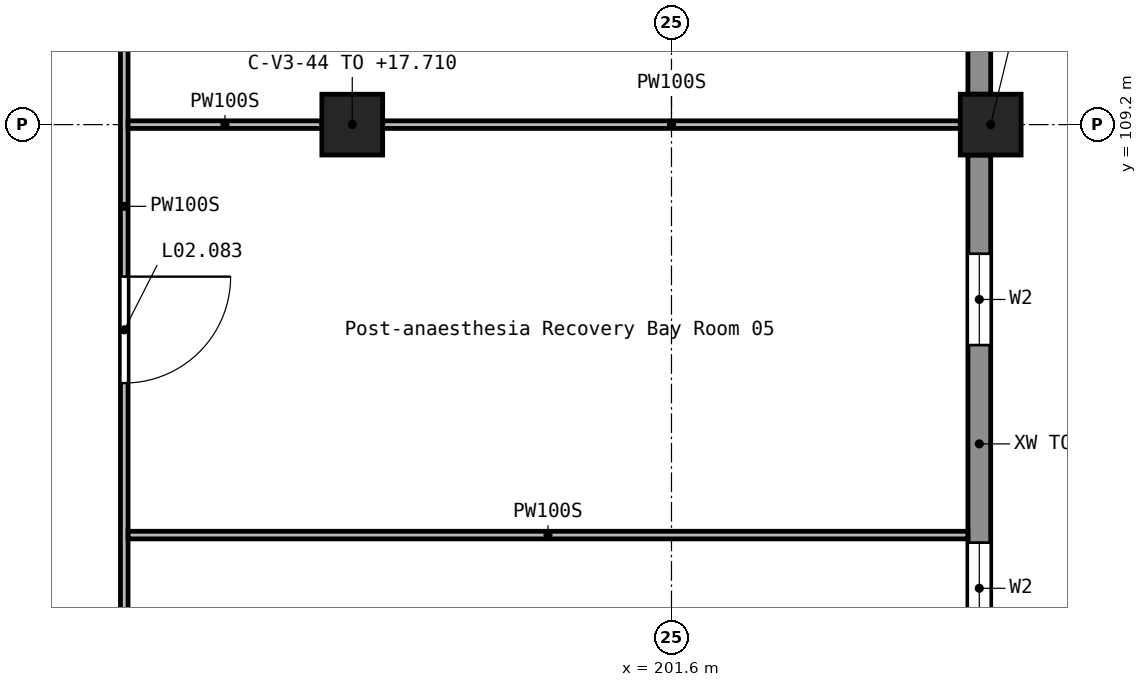
"""IFC4 building model, lengths in metres.
Left out: names, types, materials, properties, quantities, classifications, styles, units other than length and angle.
Written with IfcOpenShell. Run it as: python <this file> out.ifc"""

import sys

from ifc_helpers import new_model, si_unit, direction, frame, frame_2d, origin, origin_2d, place, context, subcontext, project, spatial, rectangle, extrude, element, fill, save


model = new_model("IFC4")
c1 = context("Model", 3, precision=1e-05, world=origin(), true_north=direction((0.0, 1.0)))
c2 = subcontext(c1, "Body", "Model", "MODEL_VIEW")
j1 = project(units=[si_unit("LENGTHUNIT", "METRE"), si_unit("PLANEANGLEUNIT", "RADIAN")], contexts=[c1])
p1 = place(None, origin())
s1 = spatial("IfcSite", under=j1, at=p1, CompositionType="ELEMENT")
p2 = place(p1, origin())
s2 = spatial("IfcBuilding", under=s1, at=p2, CompositionType="ELEMENT")
p3 = place(p2, frame((0.0, 0.0, 12.6)))
s3 = spatial("IfcBuildingStorey", under=s2, at=p3, CompositionType="ELEMENT", Elevation=12.6)
for number, where, z_axis, x_axis in (
    (1, (197.4, 109.2, 0.0), (0.0, 0.0, 1.0), (1.0, 0.0, 0.0)),
    (2, (205.8, 109.2, 0.0), (0.0, 0.0, 1.0), (1.0, 0.0, 0.0)),
):
    element("IfcColumn", number, at=place(p3, frame(where, z_axis=z_axis, x_axis=x_axis)), inside=s3, PredefinedType="COLUMN", context=c2, shape_type="SweptSolid", body=[
        extrude(rectangle(XDim=0.8, YDim=0.8, at=origin_2d()), origin(), (0.0, 0.0, 1.0), 5.11),
    ])
p4 = place(p3, frame((205.65, 101.2, 0.0), z_axis=(0.0, 0.0, 1.0), x_axis=(0.0, 1.0, 0.0)))
e3 = element("IfcWall", 3, at=p4, inside=s3, PredefinedType="STANDARD", context=c2, shape_type="SweptSolid", body=[
    extrude(rectangle(XDim=7.6, YDim=0.3, at=frame_2d((3.8, 0.0))), origin(), (0.0, 0.0, 1.0), 3.05),
])
p5 = place(p4, frame((1.3, 0.0, 1.2)))
e4 = element("IfcOpeningElement", 4, at=p5, cuts=e3, PredefinedType="OPENING", context=c2, shape_type="SweptSolid", body=[
    extrude(rectangle(XDim=1.2, YDim=1.2, at=frame_2d((0.6, 0.6))), frame((0.0, 0.16, 0.0), z_axis=(0.0, -1.0, 0.0), x_axis=(1.0, 0.0, 0.0)), (0.0, 0.0, 1.0), 0.32),
])
p6 = place(p4, frame((5.1, 0.0, 1.2)))
e5 = element("IfcOpeningElement", 5, at=p6, cuts=e3, PredefinedType="OPENING", context=c2, shape_type="SweptSolid", body=[
    extrude(rectangle(XDim=1.2, YDim=1.2, at=frame_2d((0.6, 0.6))), frame((0.0, 0.16, 0.0), z_axis=(0.0, -1.0, 0.0), x_axis=(1.0, 0.0, 0.0)), (0.0, 0.0, 1.0), 0.32),
])
p7 = place(p3, frame((205.65, 109.6, 0.0), z_axis=(0.0, 0.0, 1.0), x_axis=(0.0, 1.0, 0.0)))
e6 = element("IfcWall", 6, at=p7, inside=s3, PredefinedType="STANDARD", context=c2, shape_type="SweptSolid", body=[
    extrude(rectangle(XDim=7.6, YDim=0.3, at=frame_2d((3.8, 0.0))), origin(), (0.0, 0.0, 1.0), 3.05),
])
p8 = place(p7, frame((1.3, 0.0, 1.2)))
e7 = element("IfcOpeningElement", 7, at=p8, cuts=e6, PredefinedType="OPENING", context=c2, shape_type="SweptSolid", body=[
    extrude(rectangle(XDim=1.2, YDim=1.2, at=frame_2d((0.6, 0.6))), frame((0.0, 0.16, 0.0), z_axis=(0.0, -1.0, 0.0), x_axis=(1.0, 0.0, 0.0)), (0.0, 0.0, 1.0), 0.32),
])
p9 = place(p7, frame((5.1, 0.0, 1.2)))
e8 = element("IfcOpeningElement", 8, at=p9, cuts=e6, PredefinedType="OPENING", context=c2, shape_type="SweptSolid", body=[
    extrude(rectangle(XDim=1.2, YDim=1.2, at=frame_2d((0.6, 0.6))), frame((0.0, 0.16, 0.0), z_axis=(0.0, -1.0, 0.0), x_axis=(1.0, 0.0, 0.0)), (0.0, 0.0, 1.0), 0.32),
])
p10 = place(p3, frame((194.4, 117.3, 0.0), z_axis=(0.0, 0.0, 1.0), x_axis=(0.0, -1.0, 0.0)))
e9 = element("IfcWall", 9, at=p10, inside=s3, PredefinedType="PARTITIONING", context=c2, shape_type="SweptSolid", body=[
    extrude(rectangle(XDim=18.35, YDim=0.1, at=frame_2d((9.175, 0.0))), origin(), (0.0, 0.0, 1.0), 3.85),
])
p11 = place(p10, frame((16.7, 0.0, 0.0)))
e10 = element("IfcOpeningElement", 10, at=p11, cuts=e9, PredefinedType="OPENING", context=c2, shape_type="SweptSolid", body=[
    extrude(rectangle(XDim=1.4, YDim=2.1, at=frame_2d((0.7, 1.05))), frame((0.0, 0.06, 0.0), z_axis=(0.0, -1.0, 0.0), x_axis=(1.0, 0.0, 0.0)), (0.0, 0.0, 1.0), 0.12),
])
p12 = place(p10, frame((14.55, 0.0, 0.0)))
e11 = element("IfcOpeningElement", 11, at=p12, cuts=e9, PredefinedType="OPENING", context=c2, shape_type="SweptSolid", body=[
    extrude(rectangle(XDim=0.9, YDim=2.1, at=frame_2d((0.45, 1.05))), frame((0.0, 0.06, 0.0), z_axis=(0.0, -1.0, 0.0), x_axis=(1.0, 0.0, 0.0)), (0.0, 0.0, 1.0), 0.12),
])
p13 = place(p10, frame((10.1, 0.0, 0.0)))
e12 = element("IfcOpeningElement", 12, at=p13, cuts=e9, PredefinedType="OPENING", context=c2, shape_type="SweptSolid", body=[
    extrude(rectangle(XDim=1.4, YDim=2.1, at=frame_2d((0.7, 1.05))), frame((0.0, 0.06, 0.0), z_axis=(0.0, -1.0, 0.0), x_axis=(1.0, 0.0, 0.0)), (0.0, 0.0, 1.0), 0.12),
])
p14 = place(p10, frame((3.45, 0.0, 0.0)))
e13 = element("IfcOpeningElement", 13, at=p14, cuts=e9, PredefinedType="OPENING", context=c2, shape_type="SweptSolid", body=[
    extrude(rectangle(XDim=0.9, YDim=2.1, at=frame_2d((0.45, 1.05))), frame((0.0, 0.06, 0.0), z_axis=(0.0, -1.0, 0.0), x_axis=(1.0, 0.0, 0.0)), (0.0, 0.0, 1.0), 0.12),
])
p15 = place(p3, frame((194.45, 103.8, 0.0), z_axis=(0.0, 0.0, 1.0), x_axis=(1.0, 0.0, 0.0)))
e14 = element("IfcWall", 14, at=p15, inside=s3, PredefinedType="PARTITIONING", context=c2, shape_type="SweptSolid", body=[
    extrude(rectangle(XDim=11.05, YDim=0.1, at=frame_2d((5.525, 0.0))), origin(), (0.0, 0.0, 1.0), 3.85),
])
p16 = place(p3, frame((194.45, 109.2, 0.0), z_axis=(0.0, 0.0, 1.0), x_axis=(1.0, 0.0, 0.0)))
e15 = element("IfcWall", 15, at=p16, inside=s3, PredefinedType="PARTITIONING", context=c2, shape_type="SweptSolid", body=[
    extrude(rectangle(XDim=2.55, YDim=0.1, at=frame_2d((1.275, 0.0))), origin(), (0.0, 0.0, 1.0), 3.85),
])
p17 = place(p3, frame((197.8, 109.2, 0.0), z_axis=(0.0, 0.0, 1.0), x_axis=(1.0, 0.0, 0.0)))
e16 = element("IfcWall", 16, at=p17, inside=s3, PredefinedType="PARTITIONING", context=c2, shape_type="SweptSolid", body=[
    extrude(rectangle(XDim=7.6, YDim=0.1, at=frame_2d((3.8, 0.0))), origin(), (0.0, 0.0, 1.0), 3.85),
])
p18 = place(p5, origin())
e17 = element("IfcWindow", 17, at=p18, inside=s3, PartitioningType="SINGLE_PANEL", PredefinedType="WINDOW", context=c2, shape_type="SweptSolid", body=[
    extrude(rectangle(XDim=1.2, YDim=1.2, at=frame_2d((0.6, 0.6))), frame((0.0, 0.03, 0.0), z_axis=(0.0, -1.0, 0.0), x_axis=(1.0, 0.0, 0.0)), (0.0, 0.0, 1.0), 0.06),
])
fill(e4, e17)
p19 = place(p6, origin())
e18 = element("IfcWindow", 18, at=p19, inside=s3, PartitioningType="SINGLE_PANEL", PredefinedType="WINDOW", context=c2, shape_type="SweptSolid", body=[
    extrude(rectangle(XDim=1.2, YDim=1.2, at=frame_2d((0.6, 0.6))), frame((0.0, 0.03, 0.0), z_axis=(0.0, -1.0, 0.0), x_axis=(1.0, 0.0, 0.0)), (0.0, 0.0, 1.0), 0.06),
])
fill(e5, e18)
p20 = place(p13, origin())
e19 = element("IfcDoor", 19, at=p20, inside=s3, OperationType="DOUBLE_DOOR_SINGLE_SWING", PredefinedType="DOOR", context=c2, shape_type="SweptSolid", body=[
    extrude(rectangle(XDim=1.4, YDim=2.1, at=frame_2d((0.7, 1.05))), frame((0.0, 0.025, 0.0), z_axis=(0.0, -1.0, 0.0), x_axis=(1.0, 0.0, 0.0)), (0.0, 0.0, 1.0), 0.05),
])
fill(e12, e19)
save(model, sys.argv[1])
